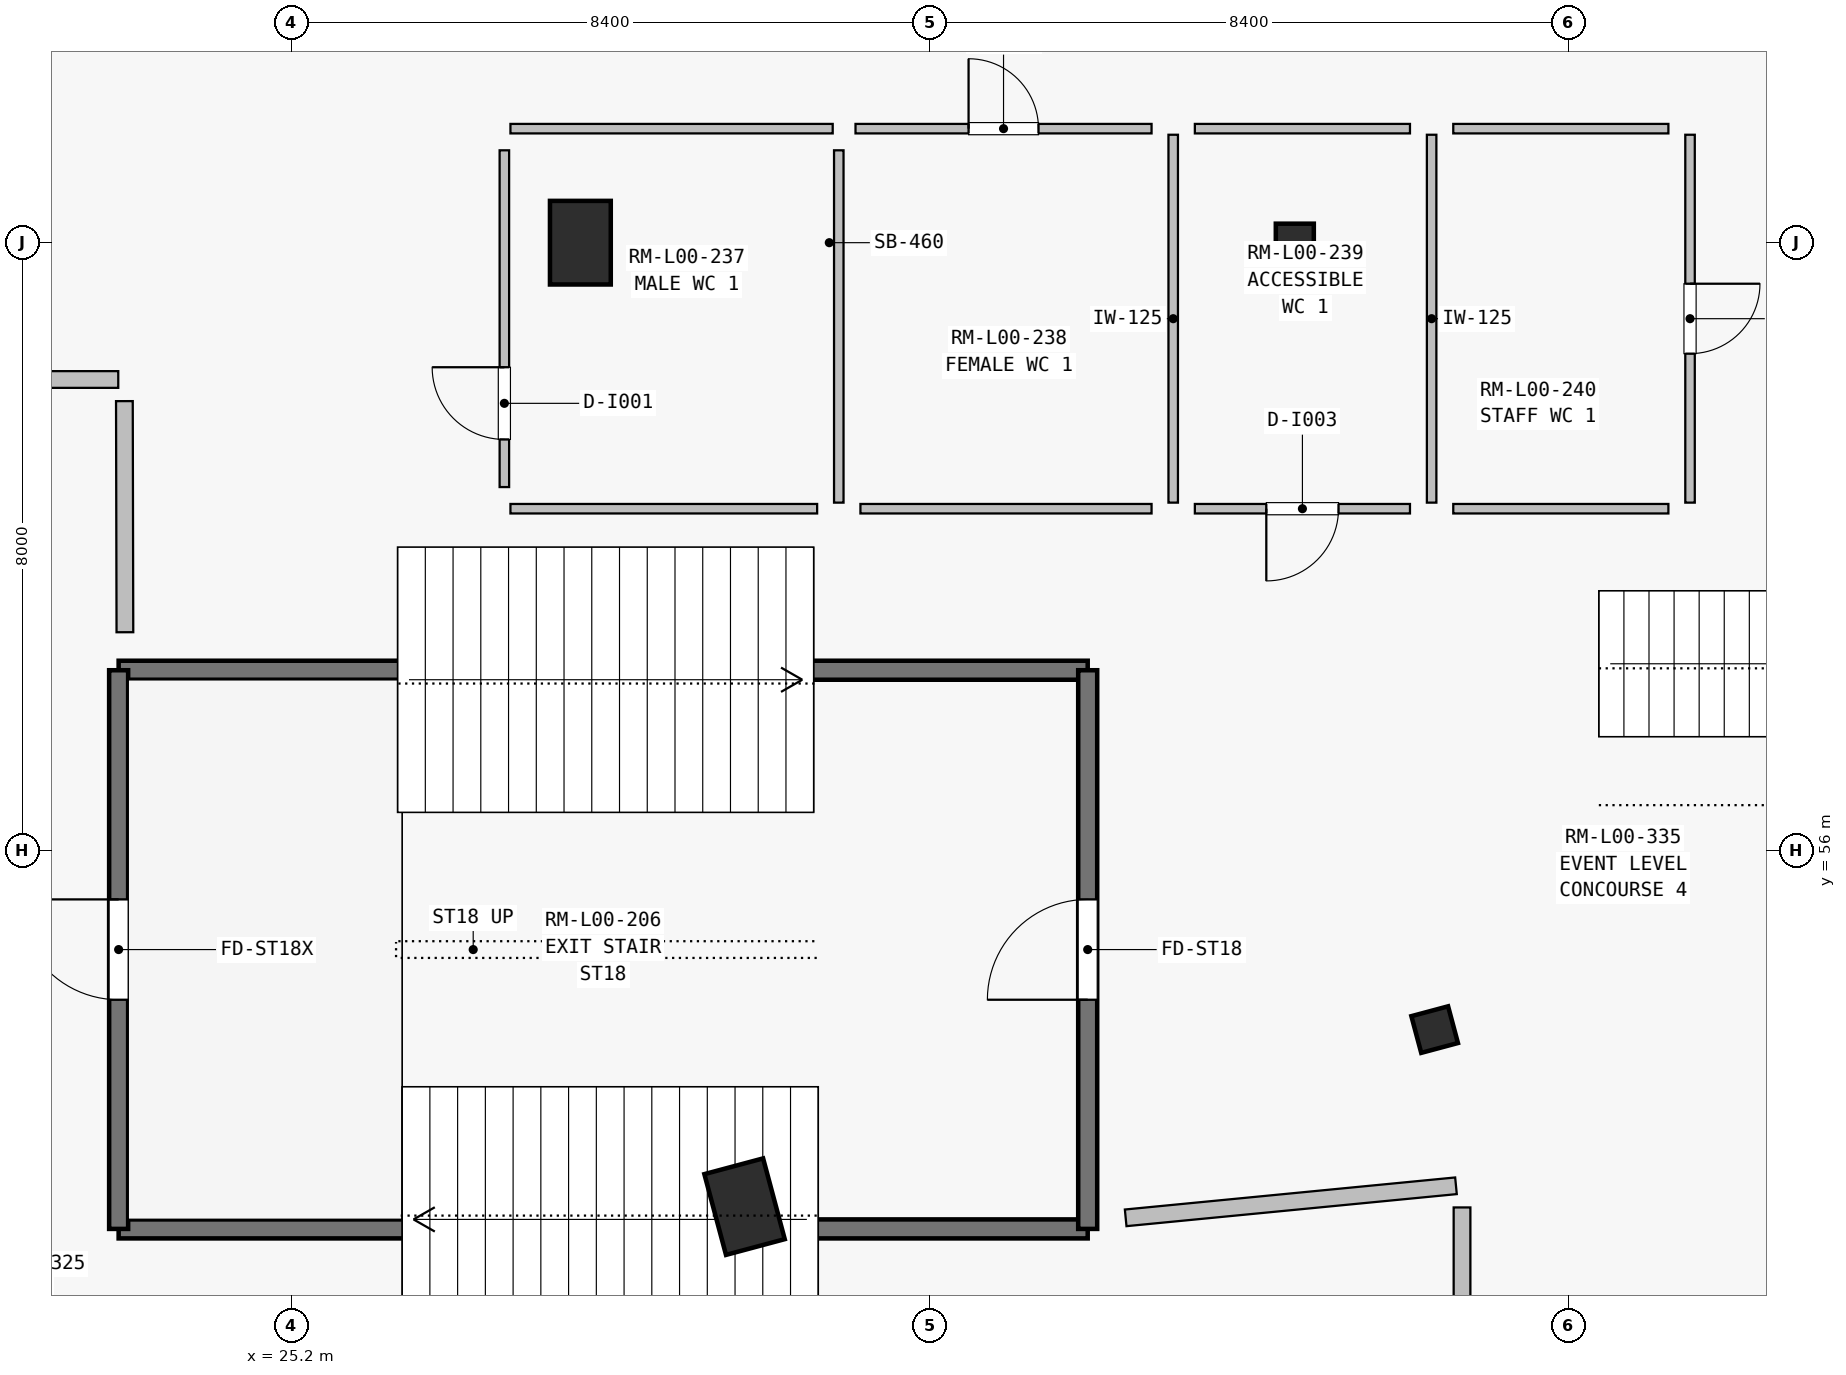
"""IFC4 building model, lengths in metres.
Left out: names, types, materials, properties, quantities, classifications, styles, units other than length and angle.
Written with IfcOpenShell. Run it as: python <this file> out.ifc"""

import sys

from ifc_helpers import new_model, si_unit, direction, frame, frame_2d, origin, origin_2d, place, context, subcontext, project, spatial, rectangle, i_section, extrude, element, fill, save


model = new_model("IFC4")
c1 = context("Model", 3, precision=1e-05, world=origin(), true_north=direction((0.0, 1.0)))
c2 = subcontext(c1, "Body", "Model", "MODEL_VIEW")
j1 = project(units=[si_unit("LENGTHUNIT", "METRE"), si_unit("PLANEANGLEUNIT", "RADIAN")], contexts=[c1])
p1 = place(None, origin())
s1 = spatial("IfcSite", under=j1, at=p1, CompositionType="ELEMENT")
p2 = place(p1, origin())
s2 = spatial("IfcBuilding", under=s1, at=p2, CompositionType="ELEMENT")
p3 = place(p2, origin())
s3 = spatial("IfcBuildingStorey", under=s2, at=p3, CompositionType="ELEMENT", Elevation=0.0)
for number, where, z_axis, x_axis in (
    (1, (38.4, 64.0, 0.0), (0.0, 0.0, 1.0), (-1.0, 0.0, 0.0)),
    (2, (40.24, 53.647, 0.0), (0.0, 0.0, 1.0), (-0.966, -0.259, 0.0)),
):
    element("IfcColumn", number, at=place(p3, frame(where, z_axis=z_axis, x_axis=x_axis)), inside=s3, PredefinedType="COLUMN", context=c2, shape_type="SweptSolid", body=[
        extrude(i_section(OverallWidth=0.5, OverallDepth=0.5, WebThickness=0.025, FlangeThickness=0.042, at=origin_2d()), origin(), (0.0, 0.0, 1.0), 5.4),
    ])
for number, where, z_axis, x_axis in (
    (3, (29.0, 64.0, 0.0), (0.0, 0.0, 1.0), (-1.0, 0.0, 0.0)),
    (4, (31.16, 51.318, 0.0), (0.0, 0.0, 1.0), (-0.966, -0.259, 0.0)),
):
    element("IfcColumn", number, at=place(p3, frame(where, z_axis=z_axis, x_axis=x_axis)), inside=s3, PredefinedType="COLUMN", context=c2, shape_type="SweptSolid", body=[
        extrude(rectangle(XDim=0.8, YDim=1.1, at=origin_2d()), origin(), (0.0, 0.0, 1.0), 5.4),
    ])
for number, where, z_axis, x_axis in (
    (5, (22.925, 51.025, 0.0), (0.0, 0.0, 1.0), (1.0, 0.0, 0.0)),
    (6, (22.925, 58.375, 0.0), (0.0, 0.0, 1.0), (1.0, 0.0, 0.0)),
):
    element("IfcWall", number, at=place(p3, frame(where, z_axis=z_axis, x_axis=x_axis)), inside=s3, PredefinedType="SHEAR", context=c2, shape_type="SweptSolid", body=[
        extrude(rectangle(XDim=12.75, YDim=0.25, at=frame_2d((6.375, 0.0))), origin(), (0.0, 0.0, 1.0), 5.4),
    ])
p4 = place(p3, frame((22.925, 51.025, 0.0), z_axis=(0.0, 0.0, 1.0), x_axis=(0.0, 1.0, 0.0)))
e7 = element("IfcWall", 7, at=p4, inside=s3, PredefinedType="SHEAR", context=c2, shape_type="SweptSolid", body=[
    extrude(rectangle(XDim=7.35, YDim=0.25, at=frame_2d((3.675, 0.0))), origin(), (0.0, 0.0, 1.0), 5.4),
])
p5 = place(p4, frame((3.015, 0.0, 0.0)))
e8 = element("IfcOpeningElement", 8, at=p5, cuts=e7, PredefinedType="OPENING", context=c2, shape_type="SweptSolid", body=[
    extrude(rectangle(XDim=1.32, YDim=2.2, at=frame_2d((0.66, 1.1))), frame((0.0, 0.135, 0.0), z_axis=(0.0, -1.0, 0.0), x_axis=(1.0, 0.0, 0.0)), (0.0, 0.0, 1.0), 0.27),
])
p6 = place(p3, frame((35.675, 51.025, 0.0), z_axis=(0.0, 0.0, 1.0), x_axis=(0.0, 1.0, 0.0)))
e9 = element("IfcWall", 9, at=p6, inside=s3, PredefinedType="SHEAR", context=c2, shape_type="SweptSolid", body=[
    extrude(rectangle(XDim=7.35, YDim=0.25, at=frame_2d((3.675, 0.0))), origin(), (0.0, 0.0, 1.0), 5.4),
])
p7 = place(p6, frame((3.015, 0.0, 0.0)))
e10 = element("IfcOpeningElement", 10, at=p7, cuts=e9, PredefinedType="OPENING", context=c2, shape_type="SweptSolid", body=[
    extrude(rectangle(XDim=1.32, YDim=2.2, at=frame_2d((0.66, 1.1))), frame((0.0, 0.135, 0.0), z_axis=(0.0, -1.0, 0.0), x_axis=(1.0, 0.0, 0.0)), (0.0, 0.0, 1.0), 0.27),
])
p8 = place(p3, frame((28.08, 65.5, 0.0), z_axis=(0.0, 0.0, 1.0), x_axis=(1.0, 0.0, 0.0)))
e11 = element("IfcWall", 11, at=p8, inside=s3, PredefinedType="PARTITIONING", context=c2, shape_type="SweptSolid", body=[
    extrude(rectangle(XDim=4.24, YDim=0.125, at=frame_2d((2.12, 0.0))), origin(), (0.0, 0.0, 1.0), 5.13),
])
p9 = place(p3, frame((32.4, 65.215, 0.0), z_axis=(0.0, 0.0, 1.0), x_axis=(0.0, -1.0, 0.0)))
e12 = element("IfcWall", 12, at=p9, inside=s3, PredefinedType="PARTITIONING", context=c2, shape_type="SweptSolid", body=[
    extrude(rectangle(XDim=4.635, YDim=0.125, at=frame_2d((2.317, 0.0))), origin(), (0.0, 0.0, 1.0), 4.493),
])
p10 = place(p3, frame((32.115, 60.5, 0.0), z_axis=(0.0, 0.0, 1.0), x_axis=(-1.0, 0.0, 0.0)))
e13 = element("IfcWall", 13, at=p10, inside=s3, PredefinedType="PARTITIONING", context=c2, shape_type="SweptSolid", body=[
    extrude(rectangle(XDim=4.035, YDim=0.125, at=frame_2d((2.018, 0.0))), origin(), (0.0, 0.0, 1.0), 5.14),
])
p11 = place(p3, frame((28.0, 60.785, 0.0), z_axis=(0.0, 0.0, 1.0), x_axis=(0.0, 1.0, 0.0)))
e14 = element("IfcWall", 14, at=p11, inside=s3, PredefinedType="PARTITIONING", context=c2, shape_type="SweptSolid", body=[
    extrude(rectangle(XDim=4.43, YDim=0.125, at=frame_2d((2.215, 0.0))), origin(), (0.0, 0.0, 1.0), 4.493),
])
p12 = place(p11, frame((0.626, 0.0, 0.0)))
e15 = element("IfcOpeningElement", 15, at=p12, cuts=e14, PredefinedType="OPENING", context=c2, shape_type="SweptSolid", body=[
    extrude(rectangle(XDim=0.95, YDim=2.1, at=frame_2d((0.475, 1.05))), frame((0.0, 0.073, 0.0), z_axis=(0.0, -1.0, 0.0), x_axis=(1.0, 0.0, 0.0)), (0.0, 0.0, 1.0), 0.145),
])
p13 = place(p3, frame((36.8, 65.42, 0.0), z_axis=(0.0, 0.0, 1.0), x_axis=(0.0, -1.0, 0.0)))
e16 = element("IfcWall", 16, at=p13, inside=s3, PredefinedType="PARTITIONING", context=c2, shape_type="SweptSolid", body=[
    extrude(rectangle(XDim=4.84, YDim=0.125, at=frame_2d((2.42, 0.0))), origin(), (0.0, 0.0, 1.0), 4.493),
])
p14 = place(p3, frame((36.515, 60.5, 0.0), z_axis=(0.0, 0.0, 1.0), x_axis=(-1.0, 0.0, 0.0)))
e17 = element("IfcWall", 17, at=p14, inside=s3, PredefinedType="PARTITIONING", context=c2, shape_type="SweptSolid", body=[
    extrude(rectangle(XDim=3.83, YDim=0.125, at=frame_2d((1.915, 0.0))), origin(), (0.0, 0.0, 1.0), 5.14),
])
p15 = place(p3, frame((32.62, 65.5, 0.0), z_axis=(0.0, 0.0, 1.0), x_axis=(1.0, 0.0, 0.0)))
e18 = element("IfcWall", 18, at=p15, inside=s3, PredefinedType="PARTITIONING", context=c2, shape_type="SweptSolid", body=[
    extrude(rectangle(XDim=3.895, YDim=0.125, at=frame_2d((1.948, 0.0))), origin(), (0.0, 0.0, 1.0), 5.13),
])
p16 = place(p15, frame((1.488, 0.0, 0.0)))
e19 = element("IfcOpeningElement", 19, at=p16, cuts=e18, PredefinedType="OPENING", context=c2, shape_type="SweptSolid", body=[
    extrude(rectangle(XDim=0.92, YDim=2.1, at=frame_2d((0.46, 1.05))), frame((0.0, 0.073, 0.0), z_axis=(0.0, -1.0, 0.0), x_axis=(1.0, 0.0, 0.0)), (0.0, 0.0, 1.0), 0.145),
])
p17 = place(p3, frame((40.2, 65.42, 0.0), z_axis=(0.0, 0.0, 1.0), x_axis=(0.0, -1.0, 0.0)))
e20 = element("IfcWall", 20, at=p17, inside=s3, PredefinedType="PARTITIONING", context=c2, shape_type="SweptSolid", body=[
    extrude(rectangle(XDim=4.84, YDim=0.125, at=frame_2d((2.42, 0.0))), origin(), (0.0, 0.0, 1.0), 4.493),
])
p18 = place(p3, frame((39.915, 60.5, 0.0), z_axis=(0.0, 0.0, 1.0), x_axis=(-1.0, 0.0, 0.0)))
e21 = element("IfcWall", 21, at=p18, inside=s3, PredefinedType="PARTITIONING", context=c2, shape_type="SweptSolid", body=[
    extrude(rectangle(XDim=2.831, YDim=0.125, at=frame_2d((1.415, 0.0))), origin(), (0.0, 0.0, 1.0), 4.305),
])
p19 = place(p18, frame((0.94, 0.0, 0.0)))
e22 = element("IfcOpeningElement", 22, at=p19, cuts=e21, PredefinedType="OPENING", context=c2, shape_type="SweptSolid", body=[
    extrude(rectangle(XDim=0.95, YDim=2.1, at=frame_2d((0.475, 1.05))), frame((0.0, 0.073, 0.0), z_axis=(0.0, -1.0, 0.0), x_axis=(1.0, 0.0, 0.0)), (0.0, 0.0, 1.0), 0.145),
])
p20 = place(p3, frame((37.085, 65.5, 0.0), z_axis=(0.0, 0.0, 1.0), x_axis=(1.0, 0.0, 0.0)))
e23 = element("IfcWall", 23, at=p20, inside=s3, PredefinedType="PARTITIONING", context=c2, shape_type="SweptSolid", body=[
    extrude(rectangle(XDim=2.831, YDim=0.125, at=frame_2d((1.415, 0.0))), origin(), (0.0, 0.0, 1.0), 4.305),
])
p21 = place(p3, frame((43.6, 65.42, 0.0), z_axis=(0.0, 0.0, 1.0), x_axis=(0.0, -1.0, 0.0)))
e24 = element("IfcWall", 24, at=p21, inside=s3, PredefinedType="PARTITIONING", context=c2, shape_type="SweptSolid", body=[
    extrude(rectangle(XDim=4.84, YDim=0.125, at=frame_2d((2.42, 0.0))), origin(), (0.0, 0.0, 1.0), 4.493),
])
p22 = place(p21, frame((1.96, 0.0, 0.0)))
e25 = element("IfcOpeningElement", 25, at=p22, cuts=e24, PredefinedType="OPENING", context=c2, shape_type="SweptSolid", body=[
    extrude(rectangle(XDim=0.92, YDim=2.1, at=frame_2d((0.46, 1.05))), frame((0.0, 0.073, 0.0), z_axis=(0.0, -1.0, 0.0), x_axis=(1.0, 0.0, 0.0)), (0.0, 0.0, 1.0), 0.145),
])
for number, where, z_axis, x_axis in (
    (26, (43.315, 60.5, 0.0), (0.0, 0.0, 1.0), (-1.0, 0.0, 0.0)),
    (27, (40.485, 65.5, 0.0), (0.0, 0.0, 1.0), (1.0, 0.0, 0.0)),
):
    element("IfcWall", number, at=place(p3, frame(where, z_axis=z_axis, x_axis=x_axis)), inside=s3, PredefinedType="PARTITIONING", context=c2, shape_type="SweptSolid", body=[
        extrude(rectangle(XDim=2.83, YDim=0.125, at=frame_2d((1.415, 0.0))), origin(), (0.0, 0.0, 1.0), 4.746),
    ])
p23 = place(p3, frame((7.885, 62.2, 0.0), z_axis=(0.0, 0.0, 1.0), x_axis=(1.0, 0.0, 0.0)))
e28 = element("IfcWall", 28, at=p23, inside=s3, PredefinedType="SOLIDWALL", context=c2, shape_type="SweptSolid", body=[
    extrude(rectangle(XDim=15.035, YDim=0.22, at=frame_2d((7.518, 0.0))), origin(), (0.0, 0.0, 1.0), 4.305),
])
p24 = place(p23, frame((7.955, 0.0, 0.0)))
e29 = element("IfcOpeningElement", 29, at=p24, cuts=e28, PredefinedType="OPENING", context=c2, shape_type="SweptSolid", body=[
    extrude(rectangle(XDim=1.32, YDim=2.2, at=frame_2d((0.66, 1.1))), frame((0.0, 0.12, 0.0), z_axis=(0.0, -1.0, 0.0), x_axis=(1.0, 0.0, 0.0)), (0.0, 0.0, 1.0), 0.24),
])
p25 = place(p3, frame((23.001, 61.915, 0.0), z_axis=(0.0, 0.0, 1.0), x_axis=(0.002168147156, -0.999997649566, 0.0)))
e30 = element("IfcWall", 30, at=p25, inside=s3, PredefinedType="SOLIDWALL", context=c2, shape_type="SweptSolid", body=[
    extrude(rectangle(XDim=3.04, YDim=0.22, at=frame_2d((1.52, 0.0))), origin(), (0.0, 0.0, 1.0), 5.14),
])
p26 = place(p3, frame((36.175, 51.171, 0.0), z_axis=(0.0, 0.0, 1.0), x_axis=(0.995326812107, 0.096563642745, 0.0)))
e31 = element("IfcWall", 31, at=p26, inside=s3, PredefinedType="SOLIDWALL", context=c2, shape_type="SweptSolid", body=[
    extrude(rectangle(XDim=4.366, YDim=0.22, at=frame_2d((2.183, 0.0))), origin(), (0.0, 0.0, 1.0), 5.14),
])
p27 = place(p3, frame((40.6, 51.307, 0.0), z_axis=(0.0, 0.0, 1.0), x_axis=(0.0, -1.0, 0.0)))
e32 = element("IfcWall", 32, at=p27, inside=s3, PredefinedType="SOLIDWALL", context=c2, shape_type="SweptSolid", body=[
    extrude(rectangle(XDim=2.751, YDim=0.22, at=frame_2d((1.376, 0.0))), origin(), (0.0, 0.0, 1.0), 5.14),
])
p28 = place(p7, origin())
e33 = element("IfcDoor", 33, at=p28, inside=s3, OperationType="SINGLE_SWING_LEFT", PredefinedType="DOOR", context=c2, shape_type="SweptSolid", body=[
    extrude(rectangle(XDim=1.32, YDim=2.2, at=frame_2d((0.66, 1.1))), frame((0.0, 0.025, 0.0), z_axis=(0.0, -1.0, 0.0), x_axis=(1.0, 0.0, 0.0)), (0.0, 0.0, 1.0), 0.05),
])
fill(e10, e33)
p29 = place(p5, origin())
e34 = element("IfcDoor", 34, at=p29, inside=s3, OperationType="SINGLE_SWING_RIGHT", PredefinedType="DOOR", context=c2, shape_type="SweptSolid", body=[
    extrude(rectangle(XDim=1.32, YDim=2.2, at=frame_2d((0.66, 1.1))), frame((0.0, 0.025, 0.0), z_axis=(0.0, -1.0, 0.0), x_axis=(1.0, 0.0, 0.0)), (0.0, 0.0, 1.0), 0.05),
])
fill(e8, e34)
p30 = place(p12, origin())
e35 = element("IfcDoor", 35, at=p30, inside=s3, OperationType="SINGLE_SWING_RIGHT", PredefinedType="DOOR", context=c2, shape_type="SweptSolid", body=[
    extrude(rectangle(XDim=0.95, YDim=2.1, at=frame_2d((0.475, 1.05))), frame((0.0, 0.025, 0.0), z_axis=(0.0, -1.0, 0.0), x_axis=(1.0, 0.0, 0.0)), (0.0, 0.0, 1.0), 0.05),
])
fill(e15, e35)
p31 = place(p16, origin())
e36 = element("IfcDoor", 36, at=p31, inside=s3, OperationType="SINGLE_SWING_LEFT", PredefinedType="DOOR", context=c2, shape_type="SweptSolid", body=[
    extrude(rectangle(XDim=0.92, YDim=2.1, at=frame_2d((0.46, 1.05))), frame((0.0, 0.025, 0.0), z_axis=(0.0, -1.0, 0.0), x_axis=(1.0, 0.0, 0.0)), (0.0, 0.0, 1.0), 0.05),
])
fill(e19, e36)
p32 = place(p19, origin())
e37 = element("IfcDoor", 37, at=p32, inside=s3, OperationType="SINGLE_SWING_RIGHT", PredefinedType="DOOR", context=c2, shape_type="SweptSolid", body=[
    extrude(rectangle(XDim=0.95, YDim=2.1, at=frame_2d((0.475, 1.05))), frame((0.0, 0.025, 0.0), z_axis=(0.0, -1.0, 0.0), x_axis=(1.0, 0.0, 0.0)), (0.0, 0.0, 1.0), 0.05),
])
fill(e22, e37)
p33 = place(p22, origin())
e38 = element("IfcDoor", 38, at=p33, inside=s3, OperationType="SINGLE_SWING_LEFT", PredefinedType="DOOR", context=c2, shape_type="SweptSolid", body=[
    extrude(rectangle(XDim=0.92, YDim=2.1, at=frame_2d((0.46, 1.05))), frame((0.0, 0.025, 0.0), z_axis=(0.0, -1.0, 0.0), x_axis=(1.0, 0.0, 0.0)), (0.0, 0.0, 1.0), 0.05),
])
fill(e25, e38)
save(model, sys.argv[1])
